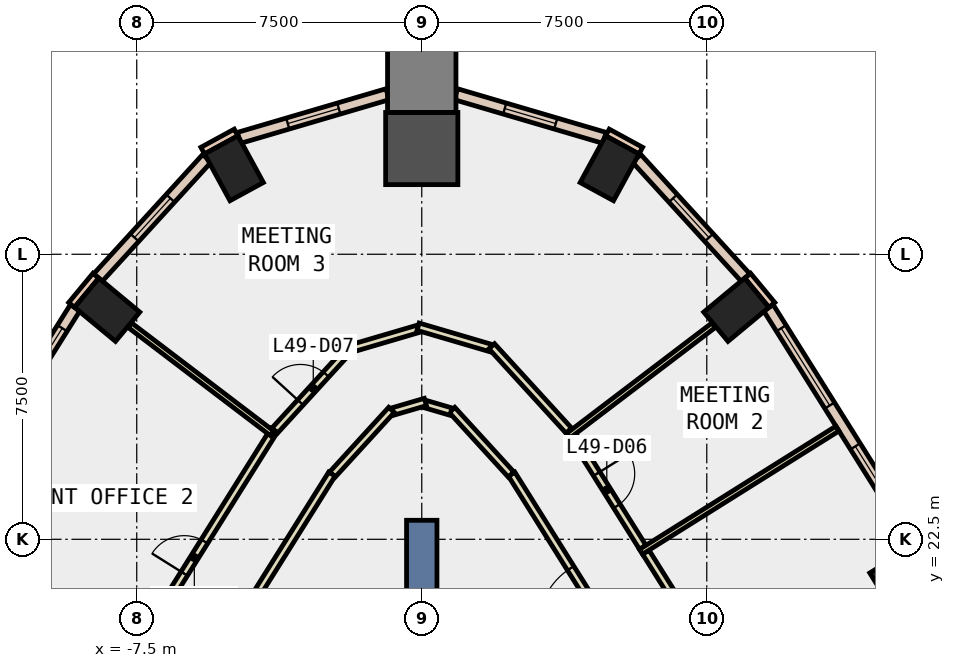
"""IFC4 building model, lengths in metres.
Left out: names, types, materials, properties, quantities, classifications, styles, units other than length and angle.
Written with IfcOpenShell. Run it as: python <this file> out.ifc"""

import sys

from ifc_helpers import new_model, si_unit, direction, frame, frame_2d, origin, origin_2d, place, context, subcontext, project, spatial, rectangle, extrude, element, fill, save


model = new_model("IFC4")
c1 = context("Model", 3, precision=1e-05, world=origin(), true_north=direction((0.0, 1.0)))
c2 = subcontext(c1, "Body", "Model", "MODEL_VIEW")
j1 = project(units=[si_unit("LENGTHUNIT", "METRE"), si_unit("PLANEANGLEUNIT", "RADIAN")], contexts=[c1])
p1 = place(None, origin())
s1 = spatial("IfcSite", under=j1, at=p1, CompositionType="ELEMENT")
p2 = place(p1, origin())
s2 = spatial("IfcBuilding", under=s1, at=p2, CompositionType="ELEMENT")
p3 = place(p2, frame((0.0, 0.0, 219.2)))
s3 = spatial("IfcBuildingStorey", under=s2, at=p3, CompositionType="ELEMENT", Elevation=219.2)
for number, where, z_axis, x_axis in (
    (1, (12.648, 21.557, -0.4), (0.0, 0.0, 1.0), (-0.525, 0.851, 0.0)),
    (2, (8.278, 28.54, -0.4), (0.0, 0.0, 1.0), (-0.639, 0.769, 0.0)),
    (3, (4.942, 32.263, -0.4), (0.0, 0.0, 1.0), (-0.878, 0.478, 0.0)),
):
    element("IfcColumn", number, at=place(p3, frame(where, z_axis=z_axis, x_axis=x_axis)), inside=s3, PredefinedType="COLUMN", context=c2, shape_type="SweptSolid", body=[
        extrude(rectangle(XDim=1.0, YDim=1.4, at=origin_2d()), origin(), (0.0, 0.0, 1.0), 4.2),
    ])
p4 = place(p3, frame((0.0, 32.782, -0.4), z_axis=(0.0, 0.0, 1.0), x_axis=(0.0, 1.0, 0.0)))
e4 = element("IfcColumn", 4, at=p4, inside=s3, PredefinedType="COLUMN", context=c2, shape_type="SweptSolid", body=[
    extrude(rectangle(XDim=1.9, YDim=1.9, at=origin_2d()), origin(), (0.0, 0.0, 1.0), 4.2),
])
for number, where, z_axis, x_axis in (
    (5, (-4.942, 32.263, -0.4), (0.0, 0.0, 1.0), (0.878, 0.478, 0.0)),
    (6, (-8.278, 28.54, -0.4), (0.0, 0.0, 1.0), (0.639, 0.769, 0.0)),
):
    element("IfcColumn", number, at=place(p3, frame(where, z_axis=z_axis, x_axis=x_axis)), inside=s3, PredefinedType="COLUMN", context=c2, shape_type="SweptSolid", body=[
        extrude(rectangle(XDim=1.0, YDim=1.4, at=origin_2d()), origin(), (0.0, 0.0, 1.0), 4.2),
    ])
p5 = place(p3, frame((0.0, 34.632, -0.4), z_axis=(0.0, 0.0, 1.0), x_axis=(0.0, 1.0, 0.0)))
e7 = element("IfcColumn", 7, at=p5, inside=s3, PredefinedType="COLUMN", context=c2, shape_type="SweptSolid", body=[
    extrude(rectangle(XDim=1.8, YDim=1.8, at=origin_2d()), origin(), (0.0, 0.0, 1.0), 4.2),
])
p6 = place(p3, frame((0.0, 14.0, -0.4), z_axis=(0.0, 0.0, 1.0), x_axis=(0.0, 1.0, 0.0)))
e8 = element("IfcWall", 8, at=p6, inside=s3, PredefinedType="SHEAR", context=c2, shape_type="SweptSolid", body=[
    extrude(rectangle(XDim=9.0, YDim=0.8, at=frame_2d((4.5, 0.0))), origin(), (0.0, 0.0, 1.0), 4.2),
])
for number, where, z_axis, x_axis in (
    (9, (5.764, 32.726, 0.0), (0.0, 0.0, 1.0), (-0.878, 0.478, 0.0)),
    (10, (-4.886, 33.204, 0.0), (0.0, 0.0, 1.0), (-0.878, -0.478, 0.0)),
):
    element("IfcWall", number, at=place(p3, frame(where, z_axis=z_axis, x_axis=x_axis)), inside=s3, PredefinedType="STANDARD", context=c2, shape_type="SweptSolid", body=[
        extrude(rectangle(XDim=1.0, YDim=0.2, at=frame_2d((0.5, 0.0))), origin(), (0.0, 0.0, 1.0), 3.8),
    ])
for number, where, z_axis, x_axis in (
    (11, (9.213, 28.666, 0.0), (0.0, 0.0, 1.0), (-0.638, 0.77, 0.0)),
    (12, (-8.575, 29.436, 0.0), (0.0, 0.0, 1.0), (-0.638, -0.77, 0.0)),
):
    element("IfcWall", number, at=place(p3, frame(where, z_axis=z_axis, x_axis=x_axis)), inside=s3, PredefinedType="STANDARD", context=c2, shape_type="SweptSolid", body=[
        extrude(rectangle(XDim=1.0, YDim=0.2, at=frame_2d((0.5, 0.0))), origin(), (0.0, 0.0, 1.0), 3.8),
    ])
p7 = place(p3, frame((13.021, 22.374, 0.0), z_axis=(0.0, 0.0, 1.0), x_axis=(-0.531239262679, 0.847221839773, 0.0)))
e13 = element("IfcWall", 13, at=p7, inside=s3, PredefinedType="STANDARD", context=c2, shape_type="SweptSolid", body=[
    extrude(rectangle(XDim=7.339, YDim=0.3, at=frame_2d((3.67, 0.0))), origin(), (0.0, 0.0, 1.0), 3.8),
])
p8 = place(p7, frame((0.635, 0.0, 0.9)))
e14 = element("IfcOpeningElement", 14, at=p8, cuts=e13, PredefinedType="OPENING", context=c2, shape_type="SweptSolid", body=[
    extrude(rectangle(XDim=2.4, YDim=2.6, at=frame_2d((1.2, 1.3))), frame((0.0, 0.16, 0.0), z_axis=(0.0, -1.0, 0.0), x_axis=(1.0, 0.0, 0.0)), (0.0, 0.0, 1.0), 0.32),
])
p9 = place(p7, frame((4.304, 0.0, 0.9)))
e15 = element("IfcOpeningElement", 15, at=p9, cuts=e13, PredefinedType="OPENING", context=c2, shape_type="SweptSolid", body=[
    extrude(rectangle(XDim=2.4, YDim=2.6, at=frame_2d((1.2, 1.3))), frame((0.0, 0.16, 0.0), z_axis=(0.0, -1.0, 0.0), x_axis=(1.0, 0.0, 0.0)), (0.0, 0.0, 1.0), 0.32),
])
p10 = place(p3, frame((8.518, 29.388, 0.0), z_axis=(0.0, 0.0, 1.0), x_axis=(-0.674487390017, 0.738286367684, 0.0)))
e16 = element("IfcWall", 16, at=p10, inside=s3, PredefinedType="STANDARD", context=c2, shape_type="SweptSolid", body=[
    extrude(rectangle(XDim=4.248, YDim=0.3, at=frame_2d((2.124, 0.0))), origin(), (0.0, 0.0, 1.0), 3.8),
])
p11 = place(p10, frame((1.424, 0.0, 0.9)))
e17 = element("IfcOpeningElement", 17, at=p11, cuts=e16, PredefinedType="OPENING", context=c2, shape_type="SweptSolid", body=[
    extrude(rectangle(XDim=1.4, YDim=2.6, at=frame_2d((0.7, 1.3))), frame((0.0, 0.16, 0.0), z_axis=(0.0, -1.0, 0.0), x_axis=(1.0, 0.0, 0.0)), (0.0, 0.0, 1.0), 0.32),
])
p12 = place(p3, frame((4.81, 33.062, 0.0), z_axis=(0.0, 0.0, 1.0), x_axis=(-0.959458909918, 0.281848541203, 0.0)))
e18 = element("IfcWall", 18, at=p12, inside=s3, PredefinedType="STANDARD", context=c2, shape_type="SweptSolid", body=[
    extrude(rectangle(XDim=4.076, YDim=0.3, at=frame_2d((2.038, 0.0))), origin(), (0.0, 0.0, 1.0), 3.8),
])
p13 = place(p12, frame((1.338, 0.0, 0.9)))
e19 = element("IfcOpeningElement", 19, at=p13, cuts=e18, PredefinedType="OPENING", context=c2, shape_type="SweptSolid", body=[
    extrude(rectangle(XDim=1.4, YDim=2.6, at=frame_2d((0.7, 1.3))), frame((0.0, 0.16, 0.0), z_axis=(0.0, -1.0, 0.0), x_axis=(1.0, 0.0, 0.0)), (0.0, 0.0, 1.0), 0.32),
])
p14 = place(p3, frame((-0.899, 34.211, 0.0), z_axis=(0.0, 0.0, 1.0), x_axis=(-0.959458909918, -0.281848541203, 0.0)))
e20 = element("IfcWall", 20, at=p14, inside=s3, PredefinedType="STANDARD", context=c2, shape_type="SweptSolid", body=[
    extrude(rectangle(XDim=4.076, YDim=0.3, at=frame_2d((2.038, 0.0))), origin(), (0.0, 0.0, 1.0), 3.8),
])
p15 = place(p14, frame((1.338, 0.0, 0.9)))
e21 = element("IfcOpeningElement", 21, at=p15, cuts=e20, PredefinedType="OPENING", context=c2, shape_type="SweptSolid", body=[
    extrude(rectangle(XDim=1.4, YDim=2.6, at=frame_2d((0.7, 1.3))), frame((0.0, 0.16, 0.0), z_axis=(0.0, -1.0, 0.0), x_axis=(1.0, 0.0, 0.0)), (0.0, 0.0, 1.0), 0.32),
])
p16 = place(p3, frame((-5.653, 32.524, 0.0), z_axis=(0.0, 0.0, 1.0), x_axis=(-0.674487390017, -0.738286367684, 0.0)))
e22 = element("IfcWall", 22, at=p16, inside=s3, PredefinedType="STANDARD", context=c2, shape_type="SweptSolid", body=[
    extrude(rectangle(XDim=4.248, YDim=0.3, at=frame_2d((2.124, 0.0))), origin(), (0.0, 0.0, 1.0), 3.8),
])
p17 = place(p16, frame((1.424, 0.0, 0.9)))
e23 = element("IfcOpeningElement", 23, at=p17, cuts=e22, PredefinedType="OPENING", context=c2, shape_type="SweptSolid", body=[
    extrude(rectangle(XDim=1.4, YDim=2.6, at=frame_2d((0.7, 1.3))), frame((0.0, 0.16, 0.0), z_axis=(0.0, -1.0, 0.0), x_axis=(1.0, 0.0, 0.0)), (0.0, 0.0, 1.0), 0.32),
])
p18 = place(p3, frame((-9.122, 28.592, 0.0), z_axis=(0.0, 0.0, 1.0), x_axis=(-0.531239262679, -0.847221839773, 0.0)))
e24 = element("IfcWall", 24, at=p18, inside=s3, PredefinedType="STANDARD", context=c2, shape_type="SweptSolid", body=[
    extrude(rectangle(XDim=7.339, YDim=0.3, at=frame_2d((3.67, 0.0))), origin(), (0.0, 0.0, 1.0), 3.8),
])
p19 = place(p18, frame((0.635, 0.0, 0.9)))
e25 = element("IfcOpeningElement", 25, at=p19, cuts=e24, PredefinedType="OPENING", context=c2, shape_type="SweptSolid", body=[
    extrude(rectangle(XDim=2.4, YDim=2.6, at=frame_2d((1.2, 1.3))), frame((0.0, 0.16, 0.0), z_axis=(0.0, -1.0, 0.0), x_axis=(1.0, 0.0, 0.0)), (0.0, 0.0, 1.0), 0.32),
])
p20 = place(p18, frame((4.304, 0.0, 0.9)))
e26 = element("IfcOpeningElement", 26, at=p20, cuts=e24, PredefinedType="OPENING", context=c2, shape_type="SweptSolid", body=[
    extrude(rectangle(XDim=2.4, YDim=2.6, at=frame_2d((1.2, 1.3))), frame((0.0, 0.16, 0.0), z_axis=(0.0, -1.0, 0.0), x_axis=(1.0, 0.0, 0.0)), (0.0, 0.0, 1.0), 0.32),
])
p21 = place(p3, frame((6.427, 17.738, 0.0), z_axis=(0.0, 0.0, 1.0), x_axis=(-0.531335643981, 0.847161397512, 0.0)))
e27 = element("IfcWall", 27, at=p21, inside=s3, PredefinedType="PARTITIONING", context=c2, shape_type="SweptSolid", body=[
    extrude(rectangle(XDim=7.647, YDim=0.2, at=frame_2d((3.823, 0.0))), origin(), (0.0, 0.0, 1.0), 3.8),
])
p22 = place(p21, frame((2.923, 0.0, 0.0)))
e28 = element("IfcOpeningElement", 28, at=p22, cuts=e27, PredefinedType="OPENING", context=c2, shape_type="SweptSolid", body=[
    extrude(rectangle(XDim=1.8, YDim=2.1, at=frame_2d((0.9, 1.05))), frame((0.0, 0.11, 0.0), z_axis=(0.0, -1.0, 0.0), x_axis=(1.0, 0.0, 0.0)), (0.0, 0.0, 1.0), 0.22),
])
p23 = place(p3, frame((2.35, 24.205, 0.0), z_axis=(0.0, 0.0, 1.0), x_axis=(-0.67475930229, 0.738037860799, 0.0)))
e29 = element("IfcWall", 29, at=p23, inside=s3, PredefinedType="PARTITIONING", context=c2, shape_type="SweptSolid", body=[
    extrude(rectangle(XDim=2.303, YDim=0.2, at=frame_2d((1.152, 0.0))), origin(), (0.0, 0.0, 1.0), 3.8),
])
p24 = place(p3, frame((0.768, 25.86, 0.0), z_axis=(0.0, 0.0, 1.0), x_axis=(-0.959714481723, 0.280977069476, 0.0)))
e30 = element("IfcWall", 30, at=p24, inside=s3, PredefinedType="PARTITIONING", context=c2, shape_type="SweptSolid", body=[
    extrude(rectangle(XDim=0.7, YDim=0.2, at=frame_2d((0.35, 0.0))), origin(), (0.0, 0.0, 1.0), 3.8),
])
p25 = place(p3, frame((0.096, 26.113, 0.0), z_axis=(0.0, 0.0, 1.0), x_axis=(-0.959723140705, -0.280947491882, 0.0)))
e31 = element("IfcWall", 31, at=p25, inside=s3, PredefinedType="PARTITIONING", context=c2, shape_type="SweptSolid", body=[
    extrude(rectangle(XDim=0.9, YDim=0.2, at=frame_2d((0.45, 0.0))), origin(), (0.0, 0.0, 1.0), 3.8),
])
p26 = place(p3, frame((-0.796, 25.905, 0.0), z_axis=(0.0, 0.0, 1.0), x_axis=(-0.67475930229, -0.738037860799, 0.0)))
e32 = element("IfcWall", 32, at=p26, inside=s3, PredefinedType="PARTITIONING", context=c2, shape_type="SweptSolid", body=[
    extrude(rectangle(XDim=2.303, YDim=0.2, at=frame_2d((1.152, 0.0))), origin(), (0.0, 0.0, 1.0), 3.8),
])
p27 = place(p3, frame((-2.364, 24.216, 0.0), z_axis=(0.0, 0.0, 1.0), x_axis=(-0.531335643981, -0.847161397512, 0.0)))
e33 = element("IfcWall", 33, at=p27, inside=s3, PredefinedType="PARTITIONING", context=c2, shape_type="SweptSolid", body=[
    extrude(rectangle(XDim=7.647, YDim=0.2, at=frame_2d((3.823, 0.0))), origin(), (0.0, 0.0, 1.0), 3.8),
])
p28 = place(p3, frame((5.895, 22.162, 0.0), z_axis=(0.0, 0.0, 1.0), x_axis=(0.531245023709, -0.847218227368, 0.0)))
e34 = element("IfcWall", 34, at=p28, inside=s3, PredefinedType="PARTITIONING", context=c2, shape_type="SweptSolid", body=[
    extrude(rectangle(XDim=4.049, YDim=0.2, at=frame_2d((2.024, 0.0))), origin(), (0.0, 0.0, 1.0), 3.8),
])
p29 = place(p3, frame((3.923, 25.307, 0.0), z_axis=(0.0, 0.0, 1.0), x_axis=(0.531150612982, -0.847277419934, 0.0)))
e35 = element("IfcWall", 35, at=p29, inside=s3, PredefinedType="PARTITIONING", context=c2, shape_type="SweptSolid", body=[
    extrude(rectangle(XDim=3.562, YDim=0.2, at=frame_2d((1.781, 0.0))), origin(), (0.0, 0.0, 1.0), 3.8),
])
p30 = place(p29, frame((1.281, 0.0, 0.0)))
e36 = element("IfcOpeningElement", 36, at=p30, cuts=e35, PredefinedType="OPENING", context=c2, shape_type="SweptSolid", body=[
    extrude(rectangle(XDim=1.0, YDim=2.1, at=frame_2d((0.5, 1.05))), frame((0.0, 0.11, 0.0), z_axis=(0.0, -1.0, 0.0), x_axis=(1.0, 0.0, 0.0)), (0.0, 0.0, 1.0), 0.22),
])
p31 = place(p3, frame((-3.869, 25.36, 0.0), z_axis=(0.0, 0.0, 1.0), x_axis=(0.674594755709, 0.738188265668, 0.0)))
e37 = element("IfcWall", 37, at=p31, inside=s3, PredefinedType="PARTITIONING", context=c2, shape_type="SweptSolid", body=[
    extrude(rectangle(XDim=3.006, YDim=0.2, at=frame_2d((1.503, 0.0))), origin(), (0.0, 0.0, 1.0), 3.8),
])
p32 = place(p31, frame((1.003, 0.0, 0.0)))
e38 = element("IfcOpeningElement", 38, at=p32, cuts=e37, PredefinedType="OPENING", context=c2, shape_type="SweptSolid", body=[
    extrude(rectangle(XDim=1.0, YDim=2.1, at=frame_2d((0.5, 1.05))), frame((0.0, 0.11, 0.0), z_axis=(0.0, -1.0, 0.0), x_axis=(1.0, 0.0, 0.0)), (0.0, 0.0, 1.0), 0.22),
])
p33 = place(p3, frame((-1.813, 27.533, 0.0), z_axis=(0.0, 0.0, 1.0), x_axis=(0.959495744111, 0.281723121227, 0.0)))
e39 = element("IfcWall", 39, at=p33, inside=s3, PredefinedType="PARTITIONING", context=c2, shape_type="SweptSolid", body=[
    extrude(rectangle(XDim=1.79, YDim=0.2, at=frame_2d((0.895, 0.0))), origin(), (0.0, 0.0, 1.0), 3.8),
])
p34 = place(p3, frame((-0.096, 28.094, 0.0), z_axis=(0.0, 0.0, 1.0), x_axis=(0.959422144877, -0.281973665293, 0.0)))
e40 = element("IfcWall", 40, at=p34, inside=s3, PredefinedType="PARTITIONING", context=c2, shape_type="SweptSolid", body=[
    extrude(rectangle(XDim=1.99, YDim=0.2, at=frame_2d((0.995, 0.0))), origin(), (0.0, 0.0, 1.0), 3.8),
])
p35 = place(p3, frame((1.841, 27.579, 0.0), z_axis=(0.0, 0.0, 1.0), x_axis=(0.674594755709, -0.738188265668, 0.0)))
e41 = element("IfcWall", 41, at=p35, inside=s3, PredefinedType="PARTITIONING", context=c2, shape_type="SweptSolid", body=[
    extrude(rectangle(XDim=3.006, YDim=0.2, at=frame_2d((1.503, 0.0))), origin(), (0.0, 0.0, 1.0), 3.8),
])
p36 = place(p3, frame((-8.086, 18.669, 0.0), z_axis=(0.0, 0.0, 1.0), x_axis=(0.531329962263, 0.847164961033, 0.0)))
e42 = element("IfcWall", 42, at=p36, inside=s3, PredefinedType="PARTITIONING", context=c2, shape_type="SweptSolid", body=[
    extrude(rectangle(XDim=7.91, YDim=0.2, at=frame_2d((3.955, 0.0))), origin(), (0.0, 0.0, 1.0), 3.8),
])
p37 = place(p36, frame((3.455, 0.0, 0.0)))
e43 = element("IfcOpeningElement", 43, at=p37, cuts=e42, PredefinedType="OPENING", context=c2, shape_type="SweptSolid", body=[
    extrude(rectangle(XDim=1.0, YDim=2.1, at=frame_2d((0.5, 1.05))), frame((0.0, 0.11, 0.0), z_axis=(0.0, -1.0, 0.0), x_axis=(1.0, 0.0, 0.0)), (0.0, 0.0, 1.0), 0.22),
])
p38 = place(p3, frame((5.77, 22.172, 0.0), z_axis=(0.0, 0.0, 1.0), x_axis=(0.847187879248, 0.531293419171, 0.0)))
e44 = element("IfcWall", 44, at=p38, inside=s3, PredefinedType="PARTITIONING", context=c2, shape_type="SweptSolid", body=[
    extrude(rectangle(XDim=6.1, YDim=0.15, at=frame_2d((3.05, 0.0))), origin(), (0.0, 0.0, 1.0), 3.8),
])
p39 = place(p3, frame((3.856, 25.225, 0.0), z_axis=(0.0, 0.0, 1.0), x_axis=(0.795987848728, 0.605312600792, 0.0)))
e45 = element("IfcWall", 45, at=p39, inside=s3, PredefinedType="PARTITIONING", context=c2, shape_type="SweptSolid", body=[
    extrude(rectangle(XDim=4.804, YDim=0.15, at=frame_2d((2.402, 0.0))), origin(), (0.0, 0.0, 1.0), 3.8),
])
p40 = place(p3, frame((-3.936, 25.286, 0.0), z_axis=(0.0, 0.0, 1.0), x_axis=(-0.795977117067, 0.605326712698, 0.0)))
e46 = element("IfcWall", 46, at=p40, inside=s3, PredefinedType="PARTITIONING", context=c2, shape_type="SweptSolid", body=[
    extrude(rectangle(XDim=4.704, YDim=0.15, at=frame_2d((2.352, 0.0))), origin(), (0.0, 0.0, 1.0), 3.8),
])
p41 = place(p3, frame((-8.131, 18.784, 0.0), z_axis=(0.0, 0.0, 1.0), x_axis=(-0.851969320918, 0.52359170755, 0.0)))
e47 = element("IfcWall", 47, at=p41, inside=s3, PredefinedType="PARTITIONING", context=c2, shape_type="SweptSolid", body=[
    extrude(rectangle(XDim=4.58, YDim=0.15, at=frame_2d((2.29, 0.0))), origin(), (0.0, 0.0, 1.0), 3.8),
])
p42 = place(p8, origin())
e48 = element("IfcWindow", 48, at=p42, inside=s3, PartitioningType="SINGLE_PANEL", PredefinedType="WINDOW", context=c2, shape_type="SweptSolid", body=[
    extrude(rectangle(XDim=2.4, YDim=2.6, at=frame_2d((1.2, 1.3))), frame((0.0, 0.03, 0.0), z_axis=(0.0, -1.0, 0.0), x_axis=(1.0, 0.0, 0.0)), (0.0, 0.0, 1.0), 0.06),
])
fill(e14, e48)
p43 = place(p9, origin())
e49 = element("IfcWindow", 49, at=p43, inside=s3, PartitioningType="SINGLE_PANEL", PredefinedType="WINDOW", context=c2, shape_type="SweptSolid", body=[
    extrude(rectangle(XDim=2.4, YDim=2.6, at=frame_2d((1.2, 1.3))), frame((0.0, 0.03, 0.0), z_axis=(0.0, -1.0, 0.0), x_axis=(1.0, 0.0, 0.0)), (0.0, 0.0, 1.0), 0.06),
])
fill(e15, e49)
p44 = place(p11, origin())
e50 = element("IfcWindow", 50, at=p44, inside=s3, PartitioningType="SINGLE_PANEL", PredefinedType="WINDOW", context=c2, shape_type="SweptSolid", body=[
    extrude(rectangle(XDim=1.4, YDim=2.6, at=frame_2d((0.7, 1.3))), frame((0.0, 0.03, 0.0), z_axis=(0.0, -1.0, 0.0), x_axis=(1.0, 0.0, 0.0)), (0.0, 0.0, 1.0), 0.06),
])
fill(e17, e50)
p45 = place(p13, origin())
e51 = element("IfcWindow", 51, at=p45, inside=s3, PartitioningType="SINGLE_PANEL", PredefinedType="WINDOW", context=c2, shape_type="SweptSolid", body=[
    extrude(rectangle(XDim=1.4, YDim=2.6, at=frame_2d((0.7, 1.3))), frame((0.0, 0.03, 0.0), z_axis=(0.0, -1.0, 0.0), x_axis=(1.0, 0.0, 0.0)), (0.0, 0.0, 1.0), 0.06),
])
fill(e19, e51)
p46 = place(p15, origin())
e52 = element("IfcWindow", 52, at=p46, inside=s3, PartitioningType="SINGLE_PANEL", PredefinedType="WINDOW", context=c2, shape_type="SweptSolid", body=[
    extrude(rectangle(XDim=1.4, YDim=2.6, at=frame_2d((0.7, 1.3))), frame((0.0, 0.03, 0.0), z_axis=(0.0, -1.0, 0.0), x_axis=(1.0, 0.0, 0.0)), (0.0, 0.0, 1.0), 0.06),
])
fill(e21, e52)
p47 = place(p17, origin())
e53 = element("IfcWindow", 53, at=p47, inside=s3, PartitioningType="SINGLE_PANEL", PredefinedType="WINDOW", context=c2, shape_type="SweptSolid", body=[
    extrude(rectangle(XDim=1.4, YDim=2.6, at=frame_2d((0.7, 1.3))), frame((0.0, 0.03, 0.0), z_axis=(0.0, -1.0, 0.0), x_axis=(1.0, 0.0, 0.0)), (0.0, 0.0, 1.0), 0.06),
])
fill(e23, e53)
p48 = place(p19, origin())
e54 = element("IfcWindow", 54, at=p48, inside=s3, PartitioningType="SINGLE_PANEL", PredefinedType="WINDOW", context=c2, shape_type="SweptSolid", body=[
    extrude(rectangle(XDim=2.4, YDim=2.6, at=frame_2d((1.2, 1.3))), frame((0.0, 0.03, 0.0), z_axis=(0.0, -1.0, 0.0), x_axis=(1.0, 0.0, 0.0)), (0.0, 0.0, 1.0), 0.06),
])
fill(e25, e54)
p49 = place(p30, origin())
e55 = element("IfcDoor", 55, at=p49, inside=s3, OperationType="SINGLE_SWING_LEFT", PredefinedType="DOOR", context=c2, shape_type="SweptSolid", body=[
    extrude(rectangle(XDim=1.0, YDim=2.1, at=frame_2d((0.5, 1.05))), frame((0.0, 0.025, 0.0), z_axis=(0.0, -1.0, 0.0), x_axis=(1.0, 0.0, 0.0)), (0.0, 0.0, 1.0), 0.05),
])
fill(e36, e55)
p50 = place(p32, origin())
e56 = element("IfcDoor", 56, at=p50, inside=s3, OperationType="SINGLE_SWING_LEFT", PredefinedType="DOOR", context=c2, shape_type="SweptSolid", body=[
    extrude(rectangle(XDim=1.0, YDim=2.1, at=frame_2d((0.5, 1.05))), frame((0.0, 0.025, 0.0), z_axis=(0.0, -1.0, 0.0), x_axis=(1.0, 0.0, 0.0)), (0.0, 0.0, 1.0), 0.05),
])
fill(e38, e56)
p51 = place(p37, origin())
e57 = element("IfcDoor", 57, at=p51, inside=s3, OperationType="SINGLE_SWING_RIGHT", PredefinedType="DOOR", context=c2, shape_type="SweptSolid", body=[
    extrude(rectangle(XDim=1.0, YDim=2.1, at=frame_2d((0.5, 1.05))), frame((0.0, 0.025, 0.0), z_axis=(0.0, -1.0, 0.0), x_axis=(1.0, 0.0, 0.0)), (0.0, 0.0, 1.0), 0.05),
])
fill(e43, e57)
p52 = place(p22, origin())
e58 = element("IfcDoor", 58, at=p52, inside=s3, OperationType="DOUBLE_DOOR_SINGLE_SWING", PredefinedType="DOOR", context=c2, shape_type="SweptSolid", body=[
    extrude(rectangle(XDim=1.8, YDim=2.1, at=frame_2d((0.9, 1.05))), frame((0.0, 0.025, 0.0), z_axis=(0.0, -1.0, 0.0), x_axis=(1.0, 0.0, 0.0)), (0.0, 0.0, 1.0), 0.05),
])
fill(e28, e58)
save(model, sys.argv[1])
